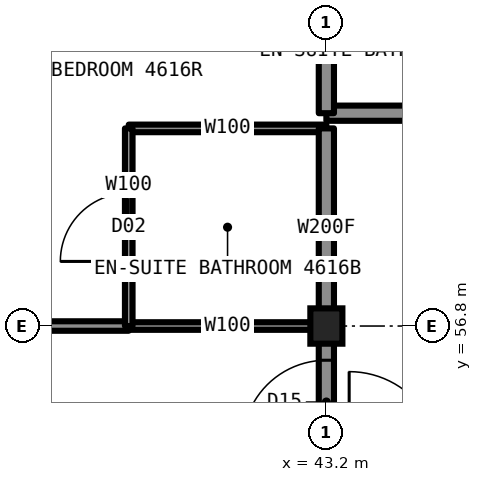
"""IFC4 building model, lengths in metres.
Left out: names, types, materials, properties, quantities, classifications, styles, units other than length and angle.
Written with IfcOpenShell. Run it as: python <this file> out.ifc"""

import sys

from ifc_helpers import new_model, si_unit, direction, frame, frame_2d, origin, origin_2d, place, context, subcontext, project, spatial, rectangle, i_section, extrude, element, fill, save


model = new_model("IFC4")
c1 = context("Model", 3, precision=1e-05, world=origin(), true_north=direction((0.0, 1.0)))
c2 = subcontext(c1, "Body", "Model", "MODEL_VIEW")
j1 = project(units=[si_unit("LENGTHUNIT", "METRE"), si_unit("PLANEANGLEUNIT", "RADIAN")], contexts=[c1])
p1 = place(None, origin())
s1 = spatial("IfcSite", under=j1, at=p1, CompositionType="ELEMENT")
p2 = place(p1, origin())
s2 = spatial("IfcBuilding", under=s1, at=p2, CompositionType="ELEMENT")
p3 = place(p2, frame((0.0, 0.0, 172.3)))
s3 = spatial("IfcBuildingStorey", under=s2, at=p3, CompositionType="ELEMENT", Elevation=172.3)
p4 = place(p3, frame((43.2, 56.8, 0.0), z_axis=(0.0, 0.0, 1.0), x_axis=(1.0, 0.0, 0.0)))
e1 = element("IfcColumn", 1, at=p4, inside=s3, PredefinedType="COLUMN", context=c2, shape_type="SweptSolid", body=[
    extrude(i_section(OverallWidth=0.422, OverallDepth=0.465, WebThickness=0.045, FlangeThickness=0.073, at=origin_2d()), origin(), (0.0, 0.0, 1.0), 3.5),
])
p5 = place(p3, frame((40.6, 56.8, 0.0), z_axis=(0.0, 0.0, 1.0), x_axis=(1.0, 0.0, 0.0)))
e2 = element("IfcWall", 2, at=p5, inside=s3, PredefinedType="PARTITIONING", context=c2, shape_type="SweptSolid", body=[
    extrude(rectangle(XDim=2.6, YDim=0.1, at=frame_2d((1.3, 0.0))), origin(), (0.0, 0.0, 1.0), 2.573),
])
p6 = place(p3, frame((36.0, 56.8, 0.0), z_axis=(0.0, 0.0, 1.0), x_axis=(1.0, 0.0, 0.0)))
e3 = element("IfcWall", 3, at=p6, inside=s3, PredefinedType="PARTITIONING", context=c2, shape_type="SweptSolid", body=[
    extrude(rectangle(XDim=4.6, YDim=0.125, at=frame_2d((2.3, 0.0))), origin(), (0.0, 0.0, 1.0), 2.573),
])
p7 = place(p6, frame((2.55, 0.0, 0.0)))
e4 = element("IfcOpeningElement", 4, at=p7, cuts=e3, PredefinedType="OPENING", context=c2, shape_type="SweptSolid", body=[
    extrude(rectangle(XDim=0.9, YDim=2.2, at=frame_2d((0.45, 1.1))), frame((0.0, 0.073, 0.0), z_axis=(0.0, -1.0, 0.0), x_axis=(1.0, 0.0, 0.0)), (0.0, 0.0, 1.0), 0.145),
])
p8 = place(p3, frame((40.6, 59.4, 0.0), z_axis=(0.0, 0.0, 1.0), x_axis=(1.0, 0.0, 0.0)))
e5 = element("IfcWall", 5, at=p8, inside=s3, PredefinedType="PARTITIONING", context=c2, shape_type="SweptSolid", body=[
    extrude(rectangle(XDim=2.6, YDim=0.1, at=frame_2d((1.3, 0.0))), origin(), (0.0, 0.0, 1.0), 3.33),
])
p9 = place(p3, frame((43.2, 59.6, 0.0), z_axis=(0.0, 0.0, 1.0), x_axis=(1.0, 0.0, 0.0)))
e6 = element("IfcWall", 6, at=p9, inside=s3, PredefinedType="PARTITIONING", context=c2, shape_type="SweptSolid", body=[
    extrude(rectangle(XDim=23.6, YDim=0.2, at=frame_2d((11.8, 0.0))), origin(), (0.0, 0.0, 1.0), 3.33),
])
p10 = place(p9, frame((2.55, 0.0, 0.0)))
e7 = element("IfcOpeningElement", 7, at=p10, cuts=e6, PredefinedType="OPENING", context=c2, shape_type="SweptSolid", body=[
    extrude(rectangle(XDim=1.0, YDim=2.2, at=frame_2d((0.5, 1.1))), frame((0.0, 0.11, 0.0), z_axis=(0.0, -1.0, 0.0), x_axis=(1.0, 0.0, 0.0)), (0.0, 0.0, 1.0), 0.22),
])
p11 = place(p9, frame((6.18, 0.0, 0.0)))
e8 = element("IfcOpeningElement", 8, at=p11, cuts=e6, PredefinedType="OPENING", context=c2, shape_type="SweptSolid", body=[
    extrude(rectangle(XDim=1.0, YDim=2.2, at=frame_2d((0.5, 1.1))), frame((0.0, 0.11, 0.0), z_axis=(0.0, -1.0, 0.0), x_axis=(1.0, 0.0, 0.0)), (0.0, 0.0, 1.0), 0.22),
])
p12 = place(p9, frame((10.9, 0.0, 0.0)))
e9 = element("IfcOpeningElement", 9, at=p12, cuts=e6, PredefinedType="OPENING", context=c2, shape_type="SweptSolid", body=[
    extrude(rectangle(XDim=1.0, YDim=2.2, at=frame_2d((0.5, 1.1))), frame((0.0, 0.11, 0.0), z_axis=(0.0, -1.0, 0.0), x_axis=(1.0, 0.0, 0.0)), (0.0, 0.0, 1.0), 0.22),
])
p13 = place(p9, frame((15.62, 0.0, 0.0)))
e10 = element("IfcOpeningElement", 10, at=p13, cuts=e6, PredefinedType="OPENING", context=c2, shape_type="SweptSolid", body=[
    extrude(rectangle(XDim=1.0, YDim=2.2, at=frame_2d((0.5, 1.1))), frame((0.0, 0.11, 0.0), z_axis=(0.0, -1.0, 0.0), x_axis=(1.0, 0.0, 0.0)), (0.0, 0.0, 1.0), 0.22),
])
p14 = place(p9, frame((19.28, 0.0, 0.0)))
e11 = element("IfcOpeningElement", 11, at=p14, cuts=e6, PredefinedType="OPENING", context=c2, shape_type="SweptSolid", body=[
    extrude(rectangle(XDim=1.0, YDim=2.2, at=frame_2d((0.5, 1.1))), frame((0.0, 0.11, 0.0), z_axis=(0.0, -1.0, 0.0), x_axis=(1.0, 0.0, 0.0)), (0.0, 0.0, 1.0), 0.22),
])
p15 = place(p3, frame((43.2, 33.2, 0.0), z_axis=(0.0, 0.0, 1.0), x_axis=(0.0, 1.0, 0.0)))
e12 = element("IfcWall", 12, at=p15, inside=s3, PredefinedType="PARTITIONING", context=c2, shape_type="SweptSolid", body=[
    extrude(rectangle(XDim=23.58, YDim=0.2, at=frame_2d((11.79, 0.0))), origin(), (0.0, 0.0, 1.0), 3.33),
])
p16 = place(p15, frame((6.18, 0.0, 0.0)))
e13 = element("IfcOpeningElement", 13, at=p16, cuts=e12, PredefinedType="OPENING", context=c2, shape_type="SweptSolid", body=[
    extrude(rectangle(XDim=1.0, YDim=2.2, at=frame_2d((0.5, 1.1))), frame((0.0, 0.11, 0.0), z_axis=(0.0, -1.0, 0.0), x_axis=(1.0, 0.0, 0.0)), (0.0, 0.0, 1.0), 0.22),
])
p17 = place(p15, frame((9.84, 0.0, 0.0)))
e14 = element("IfcOpeningElement", 14, at=p17, cuts=e12, PredefinedType="OPENING", context=c2, shape_type="SweptSolid", body=[
    extrude(rectangle(XDim=1.0, YDim=2.2, at=frame_2d((0.5, 1.1))), frame((0.0, 0.11, 0.0), z_axis=(0.0, -1.0, 0.0), x_axis=(1.0, 0.0, 0.0)), (0.0, 0.0, 1.0), 0.22),
])
p18 = place(p15, frame((14.56, 0.0, 0.0)))
e15 = element("IfcOpeningElement", 15, at=p18, cuts=e12, PredefinedType="OPENING", context=c2, shape_type="SweptSolid", body=[
    extrude(rectangle(XDim=1.0, YDim=2.2, at=frame_2d((0.5, 1.1))), frame((0.0, 0.11, 0.0), z_axis=(0.0, -1.0, 0.0), x_axis=(1.0, 0.0, 0.0)), (0.0, 0.0, 1.0), 0.22),
])
p19 = place(p15, frame((22.05, 0.0, 0.0)))
e16 = element("IfcOpeningElement", 16, at=p19, cuts=e12, PredefinedType="OPENING", context=c2, shape_type="SweptSolid", body=[
    extrude(rectangle(XDim=1.1, YDim=2.2, at=frame_2d((0.55, 1.1))), frame((0.0, 0.11, 0.0), z_axis=(0.0, -1.0, 0.0), x_axis=(1.0, 0.0, 0.0)), (0.0, 0.0, 1.0), 0.22),
])
p20 = place(p15, frame((0.66, 0.0, 0.0)))
e17 = element("IfcOpeningElement", 17, at=p20, cuts=e12, PredefinedType="OPENING", context=c2, shape_type="SweptSolid", body=[
    extrude(rectangle(XDim=1.1, YDim=2.2, at=frame_2d((0.55, 1.1))), frame((0.0, 0.11, 0.0), z_axis=(0.0, -1.0, 0.0), x_axis=(1.0, 0.0, 0.0)), (0.0, 0.0, 1.0), 0.22),
])
p21 = place(p3, frame((43.2, 59.6, 0.0), z_axis=(0.0, 0.0, 1.0), x_axis=(0.0, 1.0, 0.0)))
e18 = element("IfcWall", 18, at=p21, inside=s3, PredefinedType="PARTITIONING", context=c2, shape_type="SweptSolid", body=[
    extrude(rectangle(XDim=4.4, YDim=0.2, at=frame_2d((2.2, 0.0))), origin(), (0.0, 0.0, 1.0), 2.573),
])
p22 = place(p3, frame((40.6, 56.8, 0.0), z_axis=(0.0, 0.0, 1.0), x_axis=(0.0, 1.0, 0.0)))
e19 = element("IfcWall", 19, at=p22, inside=s3, PredefinedType="PARTITIONING", context=c2, shape_type="SweptSolid", body=[
    extrude(rectangle(XDim=2.6, YDim=0.1, at=frame_2d((1.3, 0.0))), origin(), (0.0, 0.0, 1.0), 3.33),
])
p23 = place(p22, frame((0.85, 0.0, 0.0)))
e20 = element("IfcOpeningElement", 20, at=p23, cuts=e19, PredefinedType="OPENING", context=c2, shape_type="SweptSolid", body=[
    extrude(rectangle(XDim=0.9, YDim=2.1, at=frame_2d((0.45, 1.05))), frame((0.0, 0.06, 0.0), z_axis=(0.0, -1.0, 0.0), x_axis=(1.0, 0.0, 0.0)), (0.0, 0.0, 1.0), 0.12),
])
p24 = place(p3, frame((43.2, 56.78, 0.0), z_axis=(0.0, 0.0, 1.0), x_axis=(0.0, 1.0, 0.0)))
e21 = element("IfcWall", 21, at=p24, inside=s3, PredefinedType="PARTITIONING", context=c2, shape_type="SweptSolid", body=[
    extrude(rectangle(XDim=2.62, YDim=0.2, at=frame_2d((1.31, 0.0))), origin(), (0.0, 0.0, 1.0), 2.573),
])
p25 = place(p19, origin())
e22 = element("IfcDoor", 22, at=p25, inside=s3, OperationType="SINGLE_SWING_LEFT", PredefinedType="DOOR", context=c2, shape_type="SweptSolid", body=[
    extrude(rectangle(XDim=1.1, YDim=2.2, at=frame_2d((0.55, 1.1))), frame((0.0, 0.025, 0.0), z_axis=(0.0, -1.0, 0.0), x_axis=(1.0, 0.0, 0.0)), (0.0, 0.0, 1.0), 0.05),
])
fill(e16, e22)
p26 = place(p23, origin())
e23 = element("IfcDoor", 23, at=p26, inside=s3, OperationType="SINGLE_SWING_RIGHT", PredefinedType="DOOR", context=c2, shape_type="SweptSolid", body=[
    extrude(rectangle(XDim=0.9, YDim=2.1, at=frame_2d((0.45, 1.05))), frame((0.0, 0.025, 0.0), z_axis=(0.0, -1.0, 0.0), x_axis=(1.0, 0.0, 0.0)), (0.0, 0.0, 1.0), 0.05),
])
fill(e20, e23)
save(model, sys.argv[1])
